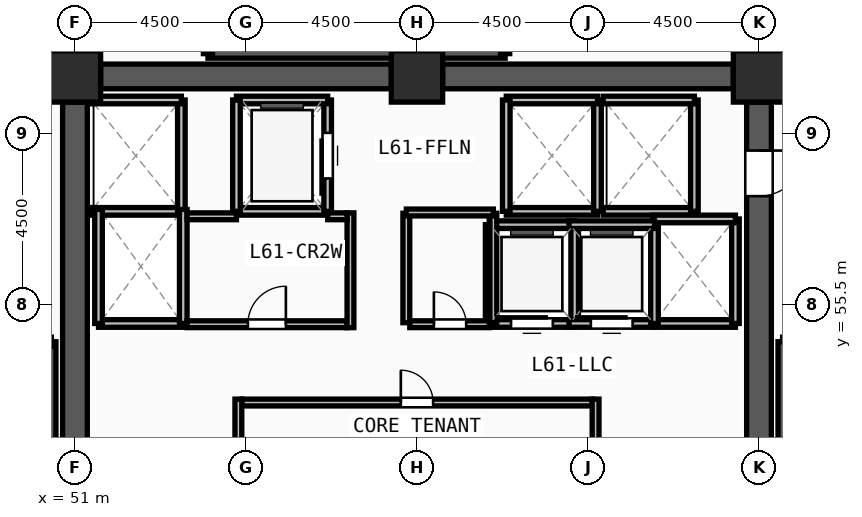
"""IFC4 building model, lengths in metres.
Left out: names, types, materials, properties, quantities, classifications, styles, units other than length and angle.
Written with IfcOpenShell. Run it as: python <this file> out.ifc"""

import sys

from ifc_helpers import new_model, si_unit, direction, frame, frame_2d, origin, origin_2d, place, context, subcontext, project, spatial, rectangle, extrude, source, transform, mapped, element, fill, save


model = new_model("IFC4")
c1 = context("Model", 3, precision=1e-05, world=origin(), true_north=direction((0.0, 1.0)))
c2 = subcontext(c1, "Body", "Model", "MODEL_VIEW")
j1 = project(units=[si_unit("LENGTHUNIT", "METRE"), si_unit("PLANEANGLEUNIT", "RADIAN")], contexts=[c1])
p1 = place(None, origin())
s1 = spatial("IfcSite", under=j1, at=p1, CompositionType="ELEMENT")
p2 = place(p1, origin())
s2 = spatial("IfcBuilding", under=s1, at=p2, CompositionType="ELEMENT")
p3 = place(p2, frame((0.0, 0.0, 236.25)))
s3 = spatial("IfcBuildingStorey", under=s2, at=p3, CompositionType="ELEMENT", Elevation=236.25)
m1 = source(origin(), c2, "Body", "SweptSolid", [
    extrude(rectangle(XDim=1.35, YDim=1.35, at=origin_2d()), origin(), (0.0, 0.0, 1.0), 3.75),
])
for number, where, z_axis, x_axis in (
    (1, (69.0, 61.5, 0.0), (0.0, 0.0, 1.0), (1.0, 0.0, 0.0)),
    (2, (60.0, 61.5, 0.0), (0.0, 0.0, 1.0), (1.0, 0.0, 0.0)),
    (3, (51.0, 61.5, 0.0), (0.0, 0.0, 1.0), (1.0, 0.0, 0.0)),
):
    element("IfcColumn", number, at=place(p3, frame(where, z_axis=z_axis, x_axis=x_axis)), inside=s3, PredefinedType="COLUMN", context=c2, shape_type="MappedRepresentation", body=[
        mapped(m1, transform((0.0, 0.0, 0.0), x_axis=(1.0, 0.0, 0.0), y_axis=(0.0, 1.0, 0.0), z_axis=(0.0, 0.0, 1.0), scale=1.0)),
    ])
for number, where, z_axis, x_axis in (
    (4, (51.675, 61.5, 0.0), (0.0, 0.0, 1.0), (1.0, 0.0, 0.0)),
    (5, (60.675, 61.5, 0.0), (0.0, 0.0, 1.0), (1.0, 0.0, 0.0)),
):
    element("IfcWall", number, at=place(p3, frame(where, z_axis=z_axis, x_axis=x_axis)), inside=s3, PredefinedType="SHEAR", context=c2, shape_type="SweptSolid", body=[
        extrude(rectangle(XDim=7.65, YDim=0.65, at=frame_2d((3.825, 0.0))), origin(), (0.0, 0.0, 1.0), 3.57),
    ])
p4 = place(p3, frame((69.0, 60.825, 0.0), z_axis=(0.0, 0.0, 1.0), x_axis=(0.0, -1.0, 0.0)))
e6 = element("IfcWall", 6, at=p4, inside=s3, PredefinedType="SHEAR", context=c2, shape_type="SweptSolid", body=[
    extrude(rectangle(XDim=13.65, YDim=0.65, at=frame_2d((6.825, 0.0))), origin(), (0.0, 0.0, 1.0), 3.57),
])
m2 = source(origin(), c2, "Body", "SweptSolid", [
    extrude(rectangle(XDim=1.2, YDim=2.2, at=frame_2d((0.6, 1.1))), frame((0.0, 0.335, 0.0), z_axis=(0.0, -1.0, 0.0), x_axis=(1.0, 0.0, 0.0)), (0.0, 0.0, 1.0), 0.67),
])
p5 = place(p4, frame((1.275, 0.0, 0.0)))
e7 = element("IfcOpeningElement", 7, at=p5, cuts=e6, PredefinedType="OPENING", context=c2, shape_type="MappedRepresentation", body=[
    mapped(m2, transform((0.0, 0.0, 0.0), x_axis=(1.0, 0.0, 0.0), y_axis=(0.0, 1.0, 0.0), z_axis=(0.0, 0.0, 1.0), scale=1.0)),
])
p6 = place(p3, frame((51.0, 47.175, 0.0), z_axis=(0.0, 0.0, 1.0), x_axis=(0.0, 1.0, 0.0)))
e8 = element("IfcWall", 8, at=p6, inside=s3, PredefinedType="SHEAR", context=c2, shape_type="SweptSolid", body=[
    extrude(rectangle(XDim=13.65, YDim=0.65, at=frame_2d((6.825, 0.0))), origin(), (0.0, 0.0, 1.0), 3.57),
])
for number, where, z_axis, x_axis in (
    (9, (50.38, 46.7, 0.0), (0.0, 0.0, 1.0), (0.0, 1.0, 0.0)),
    (10, (69.62, 54.52, 0.0), (0.0, 0.0, 1.0), (0.0, -1.0, 0.0)),
    (11, (54.5, 62.1, 0.0), (0.0, 0.0, 1.0), (1.0, 0.0, 0.0)),
):
    element("IfcWall", number, at=place(p3, frame(where, z_axis=z_axis, x_axis=x_axis)), inside=s3, PredefinedType="SOLIDWALL", context=c2, shape_type="SweptSolid", body=[
        extrude(rectangle(XDim=7.82, YDim=0.24, at=frame_2d((3.91, 0.0))), origin(), (0.0, 0.0, 1.0), 3.57),
    ])
for number, where, z_axis, x_axis in (
    (12, (62.32, 62.1, 0.0), (0.0, 0.0, 1.0), (0.0, 1.0, 0.0)),
    (13, (54.5, 65.54, 0.0), (0.0, 0.0, 1.0), (0.0, -1.0, 0.0)),
):
    element("IfcWall", number, at=place(p3, frame(where, z_axis=z_axis, x_axis=x_axis)), inside=s3, PredefinedType="SOLIDWALL", context=c2, shape_type="SweptSolid", body=[
        extrude(rectangle(XDim=3.44, YDim=0.24, at=frame_2d((1.72, 0.0))), origin(), (0.0, 0.0, 1.0), 3.57),
    ])
p7 = place(p3, frame((55.25, 57.95, 0.0), z_axis=(0.0, 0.0, 1.0), x_axis=(1.0, 0.0, 0.0)))
e14 = element("IfcWall", 14, at=p7, inside=s3, PredefinedType="SOLIDWALL", context=c2, shape_type="SweptSolid", body=[
    extrude(rectangle(XDim=2.4, YDim=0.2, at=frame_2d((1.2, 0.0))), origin(), (0.0, 0.0, 1.0), 3.57),
])
p8 = place(p3, frame((57.65, 57.95, 0.0), z_axis=(0.0, 0.0, 1.0), x_axis=(0.0, 1.0, 0.0)))
e15 = element("IfcWall", 15, at=p8, inside=s3, PredefinedType="SOLIDWALL", context=c2, shape_type="SweptSolid", body=[
    extrude(rectangle(XDim=2.93, YDim=0.2, at=frame_2d((1.465, 0.0))), origin(), (0.0, 0.0, 1.0), 3.57),
])
m3 = source(origin(), c2, "Body", "SweptSolid", [
    extrude(rectangle(XDim=1.2, YDim=2.3, at=frame_2d((0.6, 1.15))), frame((0.0, 0.11, 0.0), z_axis=(0.0, -1.0, 0.0), x_axis=(1.0, 0.0, 0.0)), (0.0, 0.0, 1.0), 0.22),
])
p9 = place(p8, frame((0.865, 0.0, 0.0)))
e16 = element("IfcOpeningElement", 16, at=p9, cuts=e15, PredefinedType="OPENING", context=c2, shape_type="MappedRepresentation", body=[
    mapped(m3, transform((0.0, 0.0, 0.0), x_axis=(1.0, 0.0, 0.0), y_axis=(0.0, 1.0, 0.0), z_axis=(0.0, 0.0, 1.0), scale=1.0)),
])
p10 = place(p3, frame((57.65, 60.88, 0.0), z_axis=(0.0, 0.0, 1.0), x_axis=(-1.0, 0.0, 0.0)))
e17 = element("IfcWall", 17, at=p10, inside=s3, PredefinedType="SOLIDWALL", context=c2, shape_type="SweptSolid", body=[
    extrude(rectangle(XDim=2.4, YDim=0.2, at=frame_2d((1.2, 0.0))), origin(), (0.0, 0.0, 1.0), 3.57),
])
p11 = place(p3, frame((55.25, 60.88, 0.0), z_axis=(0.0, 0.0, 1.0), x_axis=(0.0, -1.0, 0.0)))
e18 = element("IfcWall", 18, at=p11, inside=s3, PredefinedType="SOLIDWALL", context=c2, shape_type="SweptSolid", body=[
    extrude(rectangle(XDim=2.93, YDim=0.2, at=frame_2d((1.465, 0.0))), origin(), (0.0, 0.0, 1.0), 3.57),
])
p12 = place(p3, frame((62.35, 57.95, 0.0), z_axis=(0.0, 0.0, 1.0), x_axis=(1.0, 0.0, 0.0)))
e19 = element("IfcWall", 19, at=p12, inside=s3, PredefinedType="SOLIDWALL", context=c2, shape_type="SweptSolid", body=[
    extrude(rectangle(XDim=2.4, YDim=0.2, at=frame_2d((1.2, 0.0))), origin(), (0.0, 0.0, 1.0), 3.57),
])
p13 = place(p3, frame((64.75, 57.95, 0.0), z_axis=(0.0, 0.0, 1.0), x_axis=(0.0, 1.0, 0.0)))
e20 = element("IfcWall", 20, at=p13, inside=s3, PredefinedType="SOLIDWALL", context=c2, shape_type="SweptSolid", body=[
    extrude(rectangle(XDim=2.93, YDim=0.2, at=frame_2d((1.465, 0.0))), origin(), (0.0, 0.0, 1.0), 3.57),
])
p14 = place(p3, frame((64.75, 60.88, 0.0), z_axis=(0.0, 0.0, 1.0), x_axis=(-1.0, 0.0, 0.0)))
e21 = element("IfcWall", 21, at=p14, inside=s3, PredefinedType="SOLIDWALL", context=c2, shape_type="SweptSolid", body=[
    extrude(rectangle(XDim=2.4, YDim=0.2, at=frame_2d((1.2, 0.0))), origin(), (0.0, 0.0, 1.0), 3.57),
])
p15 = place(p3, frame((62.35, 60.88, 0.0), z_axis=(0.0, 0.0, 1.0), x_axis=(0.0, -1.0, 0.0)))
e22 = element("IfcWall", 22, at=p15, inside=s3, PredefinedType="SOLIDWALL", context=c2, shape_type="SweptSolid", body=[
    extrude(rectangle(XDim=2.93, YDim=0.2, at=frame_2d((1.465, 0.0))), origin(), (0.0, 0.0, 1.0), 3.57),
])
p16 = place(p3, frame((64.9, 57.95, 0.0), z_axis=(0.0, 0.0, 1.0), x_axis=(1.0, 0.0, 0.0)))
e23 = element("IfcWall", 23, at=p16, inside=s3, PredefinedType="SOLIDWALL", context=c2, shape_type="SweptSolid", body=[
    extrude(rectangle(XDim=2.4, YDim=0.2, at=frame_2d((1.2, 0.0))), origin(), (0.0, 0.0, 1.0), 3.57),
])
p17 = place(p3, frame((67.3, 57.95, 0.0), z_axis=(0.0, 0.0, 1.0), x_axis=(0.0, 1.0, 0.0)))
e24 = element("IfcWall", 24, at=p17, inside=s3, PredefinedType="SOLIDWALL", context=c2, shape_type="SweptSolid", body=[
    extrude(rectangle(XDim=2.93, YDim=0.2, at=frame_2d((1.465, 0.0))), origin(), (0.0, 0.0, 1.0), 3.57),
])
for number, where, z_axis, x_axis in (
    (25, (67.3, 60.88, 0.0), (0.0, 0.0, 1.0), (-1.0, 0.0, 0.0)),
    (26, (51.4, 57.95, 0.0), (0.0, 0.0, 1.0), (1.0, 0.0, 0.0)),
):
    element("IfcWall", number, at=place(p3, frame(where, z_axis=z_axis, x_axis=x_axis)), inside=s3, PredefinedType="SOLIDWALL", context=c2, shape_type="SweptSolid", body=[
        extrude(rectangle(XDim=2.4, YDim=0.2, at=frame_2d((1.2, 0.0))), origin(), (0.0, 0.0, 1.0), 3.57),
    ])
p18 = place(p3, frame((53.8, 57.95, 0.0), z_axis=(0.0, 0.0, 1.0), x_axis=(0.0, 1.0, 0.0)))
e27 = element("IfcWall", 27, at=p18, inside=s3, PredefinedType="SOLIDWALL", context=c2, shape_type="SweptSolid", body=[
    extrude(rectangle(XDim=2.93, YDim=0.2, at=frame_2d((1.465, 0.0))), origin(), (0.0, 0.0, 1.0), 3.57),
])
p19 = place(p3, frame((53.8, 60.88, 0.0), z_axis=(0.0, 0.0, 1.0), x_axis=(-1.0, 0.0, 0.0)))
e28 = element("IfcWall", 28, at=p19, inside=s3, PredefinedType="SOLIDWALL", context=c2, shape_type="SweptSolid", body=[
    extrude(rectangle(XDim=2.4, YDim=0.2, at=frame_2d((1.2, 0.0))), origin(), (0.0, 0.0, 1.0), 3.57),
])
p20 = place(p3, frame((51.62, 55.0, 0.0), z_axis=(0.0, 0.0, 1.0), x_axis=(1.0, 0.0, 0.0)))
e29 = element("IfcWall", 29, at=p20, inside=s3, PredefinedType="SOLIDWALL", context=c2, shape_type="SweptSolid", body=[
    extrude(rectangle(XDim=2.23, YDim=0.2, at=frame_2d((1.115, 0.0))), origin(), (0.0, 0.0, 1.0), 3.57),
])
for number, where, z_axis, x_axis in (
    (30, (53.85, 55.0, 0.0), (0.0, 0.0, 1.0), (0.0, 1.0, 0.0)),
    (31, (51.62, 58.0, 0.0), (0.0, 0.0, 1.0), (0.0, -1.0, 0.0)),
):
    element("IfcWall", number, at=place(p3, frame(where, z_axis=z_axis, x_axis=x_axis)), inside=s3, PredefinedType="SOLIDWALL", context=c2, shape_type="SweptSolid", body=[
        extrude(rectangle(XDim=3.0, YDim=0.2, at=frame_2d((1.5, 0.0))), origin(), (0.0, 0.0, 1.0), 3.57),
    ])
p21 = place(p3, frame((66.2, 55.0, 0.0), z_axis=(0.0, 0.0, 1.0), x_axis=(1.0, 0.0, 0.0)))
e32 = element("IfcWall", 32, at=p21, inside=s3, PredefinedType="SOLIDWALL", context=c2, shape_type="SweptSolid", body=[
    extrude(rectangle(XDim=2.18, YDim=0.2, at=frame_2d((1.09, 0.0))), origin(), (0.0, 0.0, 1.0), 3.57),
])
p22 = place(p3, frame((68.38, 55.0, 0.0), z_axis=(0.0, 0.0, 1.0), x_axis=(0.0, 1.0, 0.0)))
e33 = element("IfcWall", 33, at=p22, inside=s3, PredefinedType="SOLIDWALL", context=c2, shape_type="SweptSolid", body=[
    extrude(rectangle(XDim=2.75, YDim=0.2, at=frame_2d((1.375, 0.0))), origin(), (0.0, 0.0, 1.0), 3.57),
])
p23 = place(p3, frame((68.38, 57.75, 0.0), z_axis=(0.0, 0.0, 1.0), x_axis=(-1.0, 0.0, 0.0)))
e34 = element("IfcWall", 34, at=p23, inside=s3, PredefinedType="SOLIDWALL", context=c2, shape_type="SweptSolid", body=[
    extrude(rectangle(XDim=2.18, YDim=0.2, at=frame_2d((1.09, 0.0))), origin(), (0.0, 0.0, 1.0), 3.57),
])
p24 = place(p3, frame((61.9, 55.0, 0.0), z_axis=(0.0, 0.0, 1.0), x_axis=(1.0, 0.0, 0.0)))
e35 = element("IfcWall", 35, at=p24, inside=s3, PredefinedType="SOLIDWALL", context=c2, shape_type="SweptSolid", body=[
    extrude(rectangle(XDim=2.25, YDim=0.2, at=frame_2d((1.125, 0.0))), origin(), (0.0, 0.0, 1.0), 3.57),
])
m4 = source(origin(), c2, "Body", "SweptSolid", [
    extrude(rectangle(XDim=1.1, YDim=2.2, at=frame_2d((0.55, 1.1))), frame((0.0, 0.11, 0.0), z_axis=(0.0, -1.0, 0.0), x_axis=(1.0, 0.0, 0.0)), (0.0, 0.0, 1.0), 0.22),
])
p25 = place(p24, frame((0.575, 0.0, 0.0)))
e36 = element("IfcOpeningElement", 36, at=p25, cuts=e35, PredefinedType="OPENING", context=c2, shape_type="MappedRepresentation", body=[
    mapped(m4, transform((0.0, 0.0, 0.0), x_axis=(1.0, 0.0, 0.0), y_axis=(0.0, 1.0, 0.0), z_axis=(0.0, 0.0, 1.0), scale=1.0)),
])
p26 = place(p3, frame((64.15, 55.0, 0.0), z_axis=(0.0, 0.0, 1.0), x_axis=(0.0, 1.0, 0.0)))
e37 = element("IfcWall", 37, at=p26, inside=s3, PredefinedType="SOLIDWALL", context=c2, shape_type="SweptSolid", body=[
    extrude(rectangle(XDim=2.6, YDim=0.2, at=frame_2d((1.3, 0.0))), origin(), (0.0, 0.0, 1.0), 3.57),
])
p27 = place(p3, frame((64.15, 57.6, 0.0), z_axis=(0.0, 0.0, 1.0), x_axis=(-1.0, 0.0, 0.0)))
e38 = element("IfcWall", 38, at=p27, inside=s3, PredefinedType="SOLIDWALL", context=c2, shape_type="SweptSolid", body=[
    extrude(rectangle(XDim=2.25, YDim=0.2, at=frame_2d((1.125, 0.0))), origin(), (0.0, 0.0, 1.0), 3.57),
])
p28 = place(p3, frame((61.9, 57.6, 0.0), z_axis=(0.0, 0.0, 1.0), x_axis=(0.0, -1.0, 0.0)))
e39 = element("IfcWall", 39, at=p28, inside=s3, PredefinedType="SOLIDWALL", context=c2, shape_type="SweptSolid", body=[
    extrude(rectangle(XDim=2.6, YDim=0.2, at=frame_2d((1.3, 0.0))), origin(), (0.0, 0.0, 1.0), 3.57),
])
p29 = place(p3, frame((64.0, 55.0, 0.0), z_axis=(0.0, 0.0, 1.0), x_axis=(1.0, 0.0, 0.0)))
e40 = element("IfcWall", 40, at=p29, inside=s3, PredefinedType="SOLIDWALL", context=c2, shape_type="SweptSolid", body=[
    extrude(rectangle(XDim=2.25, YDim=0.2, at=frame_2d((1.125, 0.0))), origin(), (0.0, 0.0, 1.0), 3.57),
])
p30 = place(p29, frame((0.575, 0.0, 0.0)))
e41 = element("IfcOpeningElement", 41, at=p30, cuts=e40, PredefinedType="OPENING", context=c2, shape_type="MappedRepresentation", body=[
    mapped(m4, transform((0.0, 0.0, 0.0), x_axis=(1.0, 0.0, 0.0), y_axis=(0.0, 1.0, 0.0), z_axis=(0.0, 0.0, 1.0), scale=1.0)),
])
p31 = place(p3, frame((66.25, 55.0, 0.0), z_axis=(0.0, 0.0, 1.0), x_axis=(0.0, 1.0, 0.0)))
e42 = element("IfcWall", 42, at=p31, inside=s3, PredefinedType="SOLIDWALL", context=c2, shape_type="SweptSolid", body=[
    extrude(rectangle(XDim=2.6, YDim=0.2, at=frame_2d((1.3, 0.0))), origin(), (0.0, 0.0, 1.0), 3.57),
])
p32 = place(p3, frame((66.25, 57.6, 0.0), z_axis=(0.0, 0.0, 1.0), x_axis=(-1.0, 0.0, 0.0)))
e43 = element("IfcWall", 43, at=p32, inside=s3, PredefinedType="SOLIDWALL", context=c2, shape_type="SweptSolid", body=[
    extrude(rectangle(XDim=2.25, YDim=0.2, at=frame_2d((1.125, 0.0))), origin(), (0.0, 0.0, 1.0), 3.57),
])
p33 = place(p3, frame((55.39, 52.92, 0.0), z_axis=(0.0, 0.0, 1.0), x_axis=(1.0, 0.0, 0.0)))
e44 = element("IfcWall", 44, at=p33, inside=s3, PredefinedType="PARTITIONING", context=c2, shape_type="SweptSolid", body=[
    extrude(rectangle(XDim=9.22, YDim=0.18, at=frame_2d((4.61, 0.0))), origin(), (0.0, 0.0, 1.0), 3.57),
])
m5 = source(origin(), c2, "Body", "SweptSolid", [
    extrude(rectangle(XDim=0.85, YDim=2.1, at=frame_2d((0.425, 1.05))), frame((0.0, 0.1, 0.0), z_axis=(0.0, -1.0, 0.0), x_axis=(1.0, 0.0, 0.0)), (0.0, 0.0, 1.0), 0.2),
])
p34 = place(p33, frame((4.185, 0.0, 0.0)))
e45 = element("IfcOpeningElement", 45, at=p34, cuts=e44, PredefinedType="OPENING", context=c2, shape_type="MappedRepresentation", body=[
    mapped(m5, transform((0.0, 0.0, 0.0), x_axis=(1.0, 0.0, 0.0), y_axis=(0.0, 1.0, 0.0), z_axis=(0.0, 0.0, 1.0), scale=1.0)),
])
p35 = place(p3, frame((53.95, 54.98, 0.0), z_axis=(0.0, 0.0, 1.0), x_axis=(1.0, 0.0, 0.0)))
e46 = element("IfcWall", 46, at=p35, inside=s3, PredefinedType="PARTITIONING", context=c2, shape_type="SweptSolid", body=[
    extrude(rectangle(XDim=4.21, YDim=0.18, at=frame_2d((2.105, 0.0))), origin(), (0.0, 0.0, 1.0), 3.57),
])
m6 = source(origin(), c2, "Body", "SweptSolid", [
    extrude(rectangle(XDim=1.0, YDim=2.2, at=frame_2d((0.5, 1.1))), frame((0.0, 0.1, 0.0), z_axis=(0.0, -1.0, 0.0), x_axis=(1.0, 0.0, 0.0)), (0.0, 0.0, 1.0), 0.2),
])
p36 = place(p35, frame((1.6, 0.0, 0.0)))
e47 = element("IfcOpeningElement", 47, at=p36, cuts=e46, PredefinedType="OPENING", context=c2, shape_type="MappedRepresentation", body=[
    mapped(m6, transform((0.0, 0.0, 0.0), x_axis=(1.0, 0.0, 0.0), y_axis=(0.0, 1.0, 0.0), z_axis=(0.0, 0.0, 1.0), scale=1.0)),
])
p37 = place(p3, frame((59.81, 54.98, 0.0), z_axis=(0.0, 0.0, 1.0), x_axis=(1.0, 0.0, 0.0)))
e48 = element("IfcWall", 48, at=p37, inside=s3, PredefinedType="PARTITIONING", context=c2, shape_type="SweptSolid", body=[
    extrude(rectangle(XDim=2.09, YDim=0.18, at=frame_2d((1.045, 0.0))), origin(), (0.0, 0.0, 1.0), 3.57),
])
p38 = place(p37, frame((0.635, 0.0, 0.0)))
e49 = element("IfcOpeningElement", 49, at=p38, cuts=e48, PredefinedType="OPENING", context=c2, shape_type="MappedRepresentation", body=[
    mapped(m5, transform((0.0, 0.0, 0.0), x_axis=(1.0, 0.0, 0.0), y_axis=(0.0, 1.0, 0.0), z_axis=(0.0, 0.0, 1.0), scale=1.0)),
])
for number, where, z_axis, x_axis in (
    (50, (59.72, 55.02, 0.0), (0.0, 0.0, 1.0), (0.0, 1.0, 0.0)),
    (51, (62.01, 55.02, 0.0), (0.0, 0.0, 1.0), (0.0, 1.0, 0.0)),
):
    element("IfcWall", number, at=place(p3, frame(where, z_axis=z_axis, x_axis=x_axis)), inside=s3, PredefinedType="PARTITIONING", context=c2, shape_type="SweptSolid", body=[
        extrude(rectangle(XDim=2.88, YDim=0.18, at=frame_2d((1.44, 0.0))), origin(), (0.0, 0.0, 1.0), 3.57),
    ])
p39 = place(p3, frame((59.72, 57.92, 0.0), z_axis=(0.0, 0.0, 1.0), x_axis=(1.0, 0.0, 0.0)))
e52 = element("IfcWall", 52, at=p39, inside=s3, PredefinedType="PARTITIONING", context=c2, shape_type="SweptSolid", body=[
    extrude(rectangle(XDim=2.29, YDim=0.18, at=frame_2d((1.145, 0.0))), origin(), (0.0, 0.0, 1.0), 3.57),
])
for number, where, z_axis, x_axis in (
    (53, (50.54, 61.95, 0.0), (0.0, 0.0, 1.0), (0.0, 1.0, 0.0)),
    (54, (69.46, 61.95, 0.0), (0.0, 0.0, 1.0), (0.0, 1.0, 0.0)),
):
    element("IfcWall", number, at=place(p3, frame(where, z_axis=z_axis, x_axis=x_axis)), inside=s3, PredefinedType="PARTITIONING", context=c2, shape_type="SweptSolid", body=[
        extrude(rectangle(XDim=3.63, YDim=0.18, at=frame_2d((1.815, 0.0))), origin(), (0.0, 0.0, 1.0), 3.57),
    ])
for number, where, z_axis, x_axis in (
    (55, (55.3, 50.22, 0.0), (0.0, 0.0, 1.0), (0.0, 1.0, 0.0)),
    (56, (64.7, 50.22, 0.0), (0.0, 0.0, 1.0), (0.0, 1.0, 0.0)),
):
    element("IfcWall", number, at=place(p3, frame(where, z_axis=z_axis, x_axis=x_axis)), inside=s3, PredefinedType="PARTITIONING", context=c2, shape_type="SweptSolid", body=[
        extrude(rectangle(XDim=2.79, YDim=0.18, at=frame_2d((1.395, 0.0))), origin(), (0.0, 0.0, 1.0), 3.57),
    ])
p40 = place(p3, frame((58.25, 54.89, 0.0), z_axis=(0.0, 0.0, 1.0), x_axis=(0.0, 1.0, 0.0)))
e57 = element("IfcWall", 57, at=p40, inside=s3, PredefinedType="PARTITIONING", context=c2, shape_type="SweptSolid", body=[
    extrude(rectangle(XDim=3.02, YDim=0.18, at=frame_2d((1.51, 0.0))), origin(), (0.0, 0.0, 1.0), 3.57),
])
p41 = place(p3, frame((53.95, 57.82, 0.0), z_axis=(0.0, 0.0, 1.0), x_axis=(1.0, 0.0, 0.0)))
e58 = element("IfcWall", 58, at=p41, inside=s3, PredefinedType="PARTITIONING", context=c2, shape_type="SweptSolid", body=[
    extrude(rectangle(XDim=1.3, YDim=0.18, at=frame_2d((0.65, 0.0))), origin(), (0.0, 0.0, 1.0), 3.57),
])
p42 = place(p3, frame((57.65, 57.82, 0.0), z_axis=(0.0, 0.0, 1.0), x_axis=(1.0, 0.0, 0.0)))
e59 = element("IfcWall", 59, at=p42, inside=s3, PredefinedType="PARTITIONING", context=c2, shape_type="SweptSolid", body=[
    extrude(rectangle(XDim=0.51, YDim=0.18, at=frame_2d((0.255, 0.0))), origin(), (0.0, 0.0, 1.0), 3.57),
])
m7 = source(origin(), c2, "Body", "SweptSolid", [
    extrude(rectangle(XDim=1.2, YDim=2.2, at=frame_2d((0.6, 1.1))), frame((0.0, 0.025, 0.0), z_axis=(0.0, -1.0, 0.0), x_axis=(1.0, 0.0, 0.0)), (0.0, 0.0, 1.0), 0.05),
])
p43 = place(p5, origin())
e60 = element("IfcDoor", 60, at=p43, inside=s3, OperationType="SINGLE_SWING_LEFT", PredefinedType="DOOR", context=c2, shape_type="MappedRepresentation", body=[
    mapped(m7, transform((0.0, 0.0, 0.0), x_axis=(1.0, 0.0, 0.0), y_axis=(0.0, 1.0, 0.0), z_axis=(0.0, 0.0, 1.0), scale=1.0)),
])
fill(e7, e60)
m8 = source(origin(), c2, "Body", "SweptSolid", [
    extrude(rectangle(XDim=1.2, YDim=2.3, at=frame_2d((0.6, 1.15))), frame((0.0, 0.025, 0.0), z_axis=(0.0, -1.0, 0.0), x_axis=(1.0, 0.0, 0.0)), (0.0, 0.0, 1.0), 0.05),
])
p44 = place(p9, origin())
e61 = element("IfcDoor", 61, at=p44, inside=s3, OperationType="SLIDING_TO_LEFT", PredefinedType="DOOR", context=c2, shape_type="MappedRepresentation", body=[
    mapped(m8, transform((0.0, 0.0, 0.0), x_axis=(1.0, 0.0, 0.0), y_axis=(0.0, 1.0, 0.0), z_axis=(0.0, 0.0, 1.0), scale=1.0)),
])
fill(e16, e61)
m9 = source(origin(), c2, "Body", "SweptSolid", [
    extrude(rectangle(XDim=1.1, YDim=2.2, at=frame_2d((0.55, 1.1))), frame((0.0, 0.025, 0.0), z_axis=(0.0, -1.0, 0.0), x_axis=(1.0, 0.0, 0.0)), (0.0, 0.0, 1.0), 0.05),
])
p45 = place(p25, origin())
e62 = element("IfcDoor", 62, at=p45, inside=s3, OperationType="SLIDING_TO_LEFT", PredefinedType="DOOR", context=c2, shape_type="MappedRepresentation", body=[
    mapped(m9, transform((0.0, 0.0, 0.0), x_axis=(1.0, 0.0, 0.0), y_axis=(0.0, 1.0, 0.0), z_axis=(0.0, 0.0, 1.0), scale=1.0)),
])
fill(e36, e62)
p46 = place(p30, origin())
e63 = element("IfcDoor", 63, at=p46, inside=s3, OperationType="SLIDING_TO_LEFT", PredefinedType="DOOR", context=c2, shape_type="MappedRepresentation", body=[
    mapped(m9, transform((0.0, 0.0, 0.0), x_axis=(1.0, 0.0, 0.0), y_axis=(0.0, 1.0, 0.0), z_axis=(0.0, 0.0, 1.0), scale=1.0)),
])
fill(e41, e63)
m10 = source(origin(), c2, "Body", "SweptSolid", [
    extrude(rectangle(XDim=0.85, YDim=2.1, at=frame_2d((0.425, 1.05))), frame((0.0, 0.025, 0.0), z_axis=(0.0, -1.0, 0.0), x_axis=(1.0, 0.0, 0.0)), (0.0, 0.0, 1.0), 0.05),
])
p47 = place(p34, origin())
e64 = element("IfcDoor", 64, at=p47, inside=s3, OperationType="SINGLE_SWING_LEFT", PredefinedType="DOOR", context=c2, shape_type="MappedRepresentation", body=[
    mapped(m10, transform((0.0, 0.0, 0.0), x_axis=(1.0, 0.0, 0.0), y_axis=(0.0, 1.0, 0.0), z_axis=(0.0, 0.0, 1.0), scale=1.0)),
])
fill(e45, e64)
m11 = source(origin(), c2, "Body", "SweptSolid", [
    extrude(rectangle(XDim=1.0, YDim=2.2, at=frame_2d((0.5, 1.1))), frame((0.0, 0.025, 0.0), z_axis=(0.0, -1.0, 0.0), x_axis=(1.0, 0.0, 0.0)), (0.0, 0.0, 1.0), 0.05),
])
p48 = place(p36, origin())
e65 = element("IfcDoor", 65, at=p48, inside=s3, OperationType="SINGLE_SWING_RIGHT", PredefinedType="DOOR", context=c2, shape_type="MappedRepresentation", body=[
    mapped(m11, transform((0.0, 0.0, 0.0), x_axis=(1.0, 0.0, 0.0), y_axis=(0.0, 1.0, 0.0), z_axis=(0.0, 0.0, 1.0), scale=1.0)),
])
fill(e47, e65)
p49 = place(p38, origin())
e66 = element("IfcDoor", 66, at=p49, inside=s3, OperationType="SINGLE_SWING_LEFT", PredefinedType="DOOR", context=c2, shape_type="MappedRepresentation", body=[
    mapped(m10, transform((0.0, 0.0, 0.0), x_axis=(1.0, 0.0, 0.0), y_axis=(0.0, 1.0, 0.0), z_axis=(0.0, 0.0, 1.0), scale=1.0)),
])
fill(e49, e66)
save(model, sys.argv[1])
